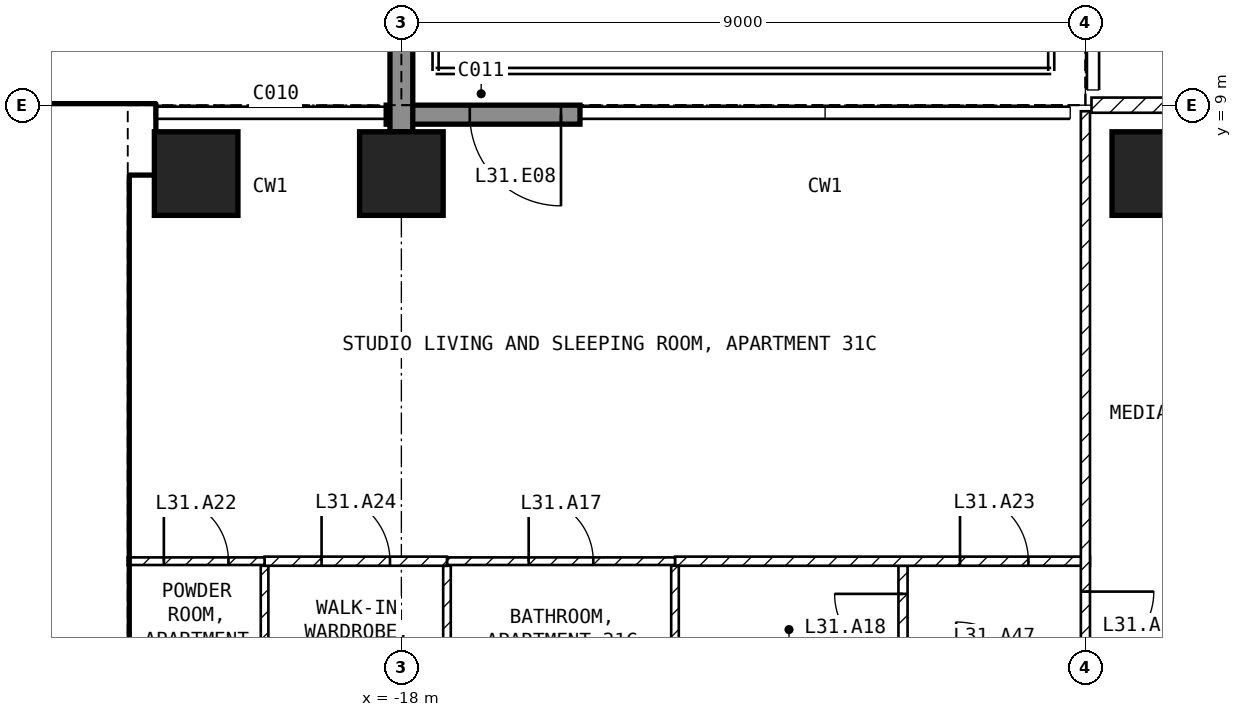
"""IFC4 building model, lengths in metres.
Left out: names, types, materials, properties, quantities, classifications, styles, units other than length and angle.
Written with IfcOpenShell. Run it as: python <this file> out.ifc"""

import sys

from ifc_helpers import new_model, si_unit, direction, frame, frame_2d, origin, origin_2d, place, context, subcontext, project, spatial, rectangle, extrude, element, fill, save


model = new_model("IFC4")
c1 = context("Model", 3, precision=1e-05, world=origin(), true_north=direction((0.0, 1.0)))
c2 = subcontext(c1, "Body", "Model", "MODEL_VIEW")
j1 = project(units=[si_unit("LENGTHUNIT", "METRE"), si_unit("PLANEANGLEUNIT", "RADIAN")], contexts=[c1])
p1 = place(None, origin())
s1 = spatial("IfcSite", under=j1, at=p1, CompositionType="ELEMENT")
p2 = place(p1, origin())
s2 = spatial("IfcBuilding", under=s1, at=p2, CompositionType="ELEMENT")
p3 = place(p2, frame((0.0, 0.0, 130.4)))
s3 = spatial("IfcBuildingStorey", under=s2, at=p3, CompositionType="ELEMENT", Elevation=130.4)
for number, where, z_axis, x_axis in (
    (1, (-20.7, 8.1, -0.25), (0.0, 0.0, 1.0), (1.0, 0.0, 0.0)),
    (2, (-18.0, 8.1, -0.25), (0.0, 0.0, 1.0), (1.0, 0.0, 0.0)),
    (3, (-8.1, 8.1, -0.25), (0.0, 0.0, 1.0), (1.0, 0.0, 0.0)),
):
    element("IfcColumn", number, at=place(p3, frame(where, z_axis=z_axis, x_axis=x_axis)), inside=s3, PredefinedType="COLUMN", context=c2, shape_type="SweptSolid", body=[
        extrude(rectangle(XDim=1.1, YDim=1.1, at=origin_2d()), origin(), (0.0, 0.0, 1.0), 3.5),
    ])
p4 = place(p3, frame((-15.65, 8.875, 0.0), z_axis=(0.0, 0.0, 1.0), x_axis=(-1.0, 0.0, 0.0)))
e4 = element("IfcWall", 4, at=p4, inside=s3, PredefinedType="SOLIDWALL", context=c2, shape_type="SweptSolid", body=[
    extrude(rectangle(XDim=2.55, YDim=0.25, at=frame_2d((1.275, 0.0))), origin(), (0.0, 0.0, 1.0), 3.25),
])
p5 = place(p4, frame((0.25, 0.0, 0.0)))
e5 = element("IfcOpeningElement", 5, at=p5, cuts=e4, PredefinedType="OPENING", context=c2, shape_type="SweptSolid", body=[
    extrude(rectangle(XDim=1.2, YDim=2.4, at=frame_2d((0.6, 1.2))), frame((0.0, 0.135, 0.0), z_axis=(0.0, -1.0, 0.0), x_axis=(1.0, 0.0, 0.0)), (0.0, 0.0, 1.0), 0.27),
])
p6 = place(p3, frame((-18.0, 8.65, 0.0), z_axis=(0.0, 0.0, 1.0), x_axis=(0.0, 1.0, 0.0)))
e6 = element("IfcWall", 6, at=p6, inside=s3, PredefinedType="SOLIDWALL", context=c2, shape_type="SweptSolid", body=[
    extrude(rectangle(XDim=3.09, YDim=0.3, at=frame_2d((1.545, 0.0))), origin(), (0.0, 0.0, 1.0), 3.25),
])
p7 = place(p3, frame((-29.45, 8.55, 0.0), z_axis=(0.0, 0.0, 1.0), x_axis=(1.0, 0.0, 0.0)))
e7 = element("IfcWall", 7, at=p7, inside=s3, PredefinedType="SHEAR", context=c2, shape_type="SweptSolid", body=[
    extrude(rectangle(XDim=8.2, YDim=0.9, at=frame_2d((4.1, 0.0))), origin(), (0.0, 0.0, 1.0), 3.25),
])
p8 = place(p3, frame((-21.825, 1.2, 0.0), z_axis=(0.0, 0.0, 1.0), x_axis=(0.0, 1.0, 0.0)))
e8 = element("IfcWall", 8, at=p8, inside=s3, PredefinedType="SHEAR", context=c2, shape_type="SweptSolid", body=[
    extrude(rectangle(XDim=6.9, YDim=0.45, at=frame_2d((3.45, 0.0))), origin(), (0.0, 0.0, 1.0), 3.25),
])
p9 = place(p3, frame((-28.35, 5.15, 0.0), z_axis=(0.0, 0.0, 1.0), x_axis=(1.0, 0.0, 0.0)))
e9 = element("IfcWall", 9, at=p9, inside=s3, PredefinedType="SOLIDWALL", context=c2, shape_type="SweptSolid", body=[
    extrude(rectangle(XDim=6.3, YDim=0.2, at=frame_2d((3.15, 0.0))), origin(), (0.0, 0.0, 1.0), 3.25),
])
p10 = place(p9, frame((5.1, 0.0, 0.0)))
e10 = element("IfcOpeningElement", 10, at=p10, cuts=e9, PredefinedType="OPENING", context=c2, shape_type="SweptSolid", body=[
    extrude(rectangle(XDim=1.0, YDim=2.1, at=frame_2d((0.5, 1.05))), frame((0.0, 0.11, 0.0), z_axis=(0.0, -1.0, 0.0), x_axis=(1.0, 0.0, 0.0)), (0.0, 0.0, 1.0), 0.22),
])
p11 = place(p3, frame((-8.92, 9.0, 0.0), z_axis=(0.0, 0.0, 1.0), x_axis=(1.0, 0.0, 0.0)))
e11 = element("IfcWall", 11, at=p11, inside=s3, PredefinedType="PARTITIONING", context=c2, shape_type="SweptSolid", body=[
    extrude(rectangle(XDim=17.84, YDim=0.2, at=frame_2d((8.92, 0.0))), origin(), (0.0, 0.0, 1.0), 3.25),
])
p12 = place(p11, frame((8.42, 0.0, 0.0)))
e12 = element("IfcOpeningElement", 12, at=p12, cuts=e11, PredefinedType="OPENING", context=c2, shape_type="SweptSolid", body=[
    extrude(rectangle(XDim=1.0, YDim=2.1, at=frame_2d((0.5, 1.05))), frame((0.0, 0.11, 0.0), z_axis=(0.0, -1.0, 0.0), x_axis=(1.0, 0.0, 0.0)), (0.0, 0.0, 1.0), 0.22),
])
p13 = place(p3, frame((-11.4, 1.3, 0.0), z_axis=(0.0, 0.0, 1.0), x_axis=(0.0, 1.0, 0.0)))
e13 = element("IfcWall", 13, at=p13, inside=s3, PredefinedType="PARTITIONING", context=c2, shape_type="SweptSolid", body=[
    extrude(rectangle(XDim=1.64, YDim=0.12, at=frame_2d((0.82, 0.0))), origin(), (0.0, 0.0, 1.0), 3.25),
])
p14 = place(p13, frame((0.37, 0.0, 0.0)))
e14 = element("IfcOpeningElement", 14, at=p14, cuts=e13, PredefinedType="OPENING", context=c2, shape_type="SweptSolid", body=[
    extrude(rectangle(XDim=0.9, YDim=2.1, at=frame_2d((0.45, 1.05))), frame((0.0, 0.07, 0.0), z_axis=(0.0, -1.0, 0.0), x_axis=(1.0, 0.0, 0.0)), (0.0, 0.0, 1.0), 0.14),
])
p15 = place(p3, frame((-14.4, 3.0, 0.0), z_axis=(0.0, 0.0, 1.0), x_axis=(1.0, 0.0, 0.0)))
e15 = element("IfcWall", 15, at=p15, inside=s3, PredefinedType="PARTITIONING", context=c2, shape_type="SweptSolid", body=[
    extrude(rectangle(XDim=5.46, YDim=0.12, at=frame_2d((2.73, 0.0))), origin(), (0.0, 0.0, 1.0), 3.25),
])
p16 = place(p15, frame((3.75, 0.0, 0.0)))
e16 = element("IfcOpeningElement", 16, at=p16, cuts=e15, PredefinedType="OPENING", context=c2, shape_type="SweptSolid", body=[
    extrude(rectangle(XDim=0.9, YDim=2.1, at=frame_2d((0.45, 1.05))), frame((0.0, 0.07, 0.0), z_axis=(0.0, -1.0, 0.0), x_axis=(1.0, 0.0, 0.0)), (0.0, 0.0, 1.0), 0.14),
])
p17 = place(p3, frame((-9.0, 8.92, 0.0), z_axis=(0.0, 0.0, 1.0), x_axis=(0.0, -1.0, 0.0)))
e17 = element("IfcWall", 17, at=p17, inside=s3, PredefinedType="PARTITIONING", context=c2, shape_type="SweptSolid", body=[
    extrude(rectangle(XDim=7.62, YDim=0.12, at=frame_2d((3.81, 0.0))), origin(), (0.0, 0.0, 1.0), 3.25),
])
p18 = place(p17, frame((6.32, 0.0, 0.0)))
e18 = element("IfcOpeningElement", 18, at=p18, cuts=e17, PredefinedType="OPENING", context=c2, shape_type="SweptSolid", body=[
    extrude(rectangle(XDim=0.9, YDim=2.1, at=frame_2d((0.45, 1.05))), frame((0.0, 0.07, 0.0), z_axis=(0.0, -1.0, 0.0), x_axis=(1.0, 0.0, 0.0)), (0.0, 0.0, 1.0), 0.14),
])
for number, where, z_axis, x_axis in (
    (19, (-14.4, 1.3, 0.0), (0.0, 0.0, 1.0), (0.0, 1.0, 0.0)),
    (20, (-17.4, 1.3, 0.0), (0.0, 0.0, 1.0), (0.0, 1.0, 0.0)),
):
    element("IfcWall", number, at=place(p3, frame(where, z_axis=z_axis, x_axis=x_axis)), inside=s3, PredefinedType="PARTITIONING", context=c2, shape_type="SweptSolid", body=[
        extrude(rectangle(XDim=1.64, YDim=0.1, at=frame_2d((0.82, 0.0))), origin(), (0.0, 0.0, 1.0), 3.25),
    ])
p19 = place(p3, frame((-17.4, 3.0, 0.0), z_axis=(0.0, 0.0, 1.0), x_axis=(1.0, 0.0, 0.0)))
e21 = element("IfcWall", 21, at=p19, inside=s3, PredefinedType="PARTITIONING", context=c2, shape_type="SweptSolid", body=[
    extrude(rectangle(XDim=3.0, YDim=0.1, at=frame_2d((1.5, 0.0))), origin(), (0.0, 0.0, 1.0), 3.25),
])
p20 = place(p19, frame((1.075, 0.0, 0.0)))
e22 = element("IfcOpeningElement", 22, at=p20, cuts=e21, PredefinedType="OPENING", context=c2, shape_type="SweptSolid", body=[
    extrude(rectangle(XDim=0.85, YDim=2.1, at=frame_2d((0.425, 1.05))), frame((0.0, 0.06, 0.0), z_axis=(0.0, -1.0, 0.0), x_axis=(1.0, 0.0, 0.0)), (0.0, 0.0, 1.0), 0.12),
])
p21 = place(p3, frame((-19.8, 1.3, 0.0), z_axis=(0.0, 0.0, 1.0), x_axis=(0.0, 1.0, 0.0)))
e23 = element("IfcWall", 23, at=p21, inside=s3, PredefinedType="PARTITIONING", context=c2, shape_type="SweptSolid", body=[
    extrude(rectangle(XDim=1.64, YDim=0.1, at=frame_2d((0.82, 0.0))), origin(), (0.0, 0.0, 1.0), 3.25),
])
p22 = place(p3, frame((-19.8, 3.0, 0.0), z_axis=(0.0, 0.0, 1.0), x_axis=(1.0, 0.0, 0.0)))
e24 = element("IfcWall", 24, at=p22, inside=s3, PredefinedType="PARTITIONING", context=c2, shape_type="SweptSolid", body=[
    extrude(rectangle(XDim=2.4, YDim=0.12, at=frame_2d((1.2, 0.0))), origin(), (0.0, 0.0, 1.0), 3.25),
])
p23 = place(p22, frame((0.75, 0.0, 0.0)))
e25 = element("IfcOpeningElement", 25, at=p23, cuts=e24, PredefinedType="OPENING", context=c2, shape_type="SweptSolid", body=[
    extrude(rectangle(XDim=0.9, YDim=2.1, at=frame_2d((0.45, 1.05))), frame((0.0, 0.07, 0.0), z_axis=(0.0, -1.0, 0.0), x_axis=(1.0, 0.0, 0.0)), (0.0, 0.0, 1.0), 0.14),
])
p24 = place(p3, frame((-21.6, 3.0, 0.0), z_axis=(0.0, 0.0, 1.0), x_axis=(1.0, 0.0, 0.0)))
e26 = element("IfcWall", 26, at=p24, inside=s3, PredefinedType="PARTITIONING", context=c2, shape_type="SweptSolid", body=[
    extrude(rectangle(XDim=1.8, YDim=0.1, at=frame_2d((0.9, 0.0))), origin(), (0.0, 0.0, 1.0), 3.25),
])
p25 = place(p24, frame((0.475, 0.0, 0.0)))
e27 = element("IfcOpeningElement", 27, at=p25, cuts=e26, PredefinedType="OPENING", context=c2, shape_type="SweptSolid", body=[
    extrude(rectangle(XDim=0.85, YDim=2.1, at=frame_2d((0.425, 1.05))), frame((0.0, 0.06, 0.0), z_axis=(0.0, -1.0, 0.0), x_axis=(1.0, 0.0, 0.0)), (0.0, 0.0, 1.0), 0.12),
])
p26 = place(p5, origin())
e28 = element("IfcDoor", 28, at=p26, inside=s3, OperationType="SINGLE_SWING_LEFT", PredefinedType="DOOR", context=c2, shape_type="SweptSolid", body=[
    extrude(rectangle(XDim=1.2, YDim=2.4, at=frame_2d((0.6, 1.2))), frame((0.0, 0.025, 0.0), z_axis=(0.0, -1.0, 0.0), x_axis=(1.0, 0.0, 0.0)), (0.0, 0.0, 1.0), 0.05),
])
fill(e5, e28)
p27 = place(p10, origin())
e29 = element("IfcDoor", 29, at=p27, inside=s3, OperationType="SINGLE_SWING_LEFT", PredefinedType="DOOR", context=c2, shape_type="SweptSolid", body=[
    extrude(rectangle(XDim=1.0, YDim=2.1, at=frame_2d((0.5, 1.05))), frame((0.0, 0.025, 0.0), z_axis=(0.0, -1.0, 0.0), x_axis=(1.0, 0.0, 0.0)), (0.0, 0.0, 1.0), 0.05),
])
fill(e10, e29)
p28 = place(p20, origin())
e30 = element("IfcDoor", 30, at=p28, inside=s3, OperationType="SINGLE_SWING_LEFT", PredefinedType="DOOR", context=c2, shape_type="SweptSolid", body=[
    extrude(rectangle(XDim=0.85, YDim=2.1, at=frame_2d((0.425, 1.05))), frame((0.0, 0.025, 0.0), z_axis=(0.0, -1.0, 0.0), x_axis=(1.0, 0.0, 0.0)), (0.0, 0.0, 1.0), 0.05),
])
fill(e22, e30)
p29 = place(p14, origin())
e31 = element("IfcDoor", 31, at=p29, inside=s3, OperationType="SINGLE_SWING_RIGHT", PredefinedType="DOOR", context=c2, shape_type="SweptSolid", body=[
    extrude(rectangle(XDim=0.9, YDim=2.1, at=frame_2d((0.45, 1.05))), frame((0.0, 0.025, 0.0), z_axis=(0.0, -1.0, 0.0), x_axis=(1.0, 0.0, 0.0)), (0.0, 0.0, 1.0), 0.05),
])
fill(e14, e31)
p30 = place(p18, origin())
e32 = element("IfcDoor", 32, at=p30, inside=s3, OperationType="SINGLE_SWING_LEFT", PredefinedType="DOOR", context=c2, shape_type="SweptSolid", body=[
    extrude(rectangle(XDim=0.9, YDim=2.1, at=frame_2d((0.45, 1.05))), frame((0.0, 0.025, 0.0), z_axis=(0.0, -1.0, 0.0), x_axis=(1.0, 0.0, 0.0)), (0.0, 0.0, 1.0), 0.05),
])
fill(e18, e32)
p31 = place(p25, origin())
e33 = element("IfcDoor", 33, at=p31, inside=s3, OperationType="SINGLE_SWING_LEFT", PredefinedType="DOOR", context=c2, shape_type="SweptSolid", body=[
    extrude(rectangle(XDim=0.85, YDim=2.1, at=frame_2d((0.425, 1.05))), frame((0.0, 0.025, 0.0), z_axis=(0.0, -1.0, 0.0), x_axis=(1.0, 0.0, 0.0)), (0.0, 0.0, 1.0), 0.05),
])
fill(e27, e33)
p32 = place(p16, origin())
e34 = element("IfcDoor", 34, at=p32, inside=s3, OperationType="SINGLE_SWING_LEFT", PredefinedType="DOOR", context=c2, shape_type="SweptSolid", body=[
    extrude(rectangle(XDim=0.9, YDim=2.1, at=frame_2d((0.45, 1.05))), frame((0.0, 0.025, 0.0), z_axis=(0.0, -1.0, 0.0), x_axis=(1.0, 0.0, 0.0)), (0.0, 0.0, 1.0), 0.05),
])
fill(e16, e34)
p33 = place(p23, origin())
e35 = element("IfcDoor", 35, at=p33, inside=s3, OperationType="SINGLE_SWING_LEFT", PredefinedType="DOOR", context=c2, shape_type="SweptSolid", body=[
    extrude(rectangle(XDim=0.9, YDim=2.1, at=frame_2d((0.45, 1.05))), frame((0.0, 0.025, 0.0), z_axis=(0.0, -1.0, 0.0), x_axis=(1.0, 0.0, 0.0)), (0.0, 0.0, 1.0), 0.05),
])
fill(e25, e35)
save(model, sys.argv[1])
